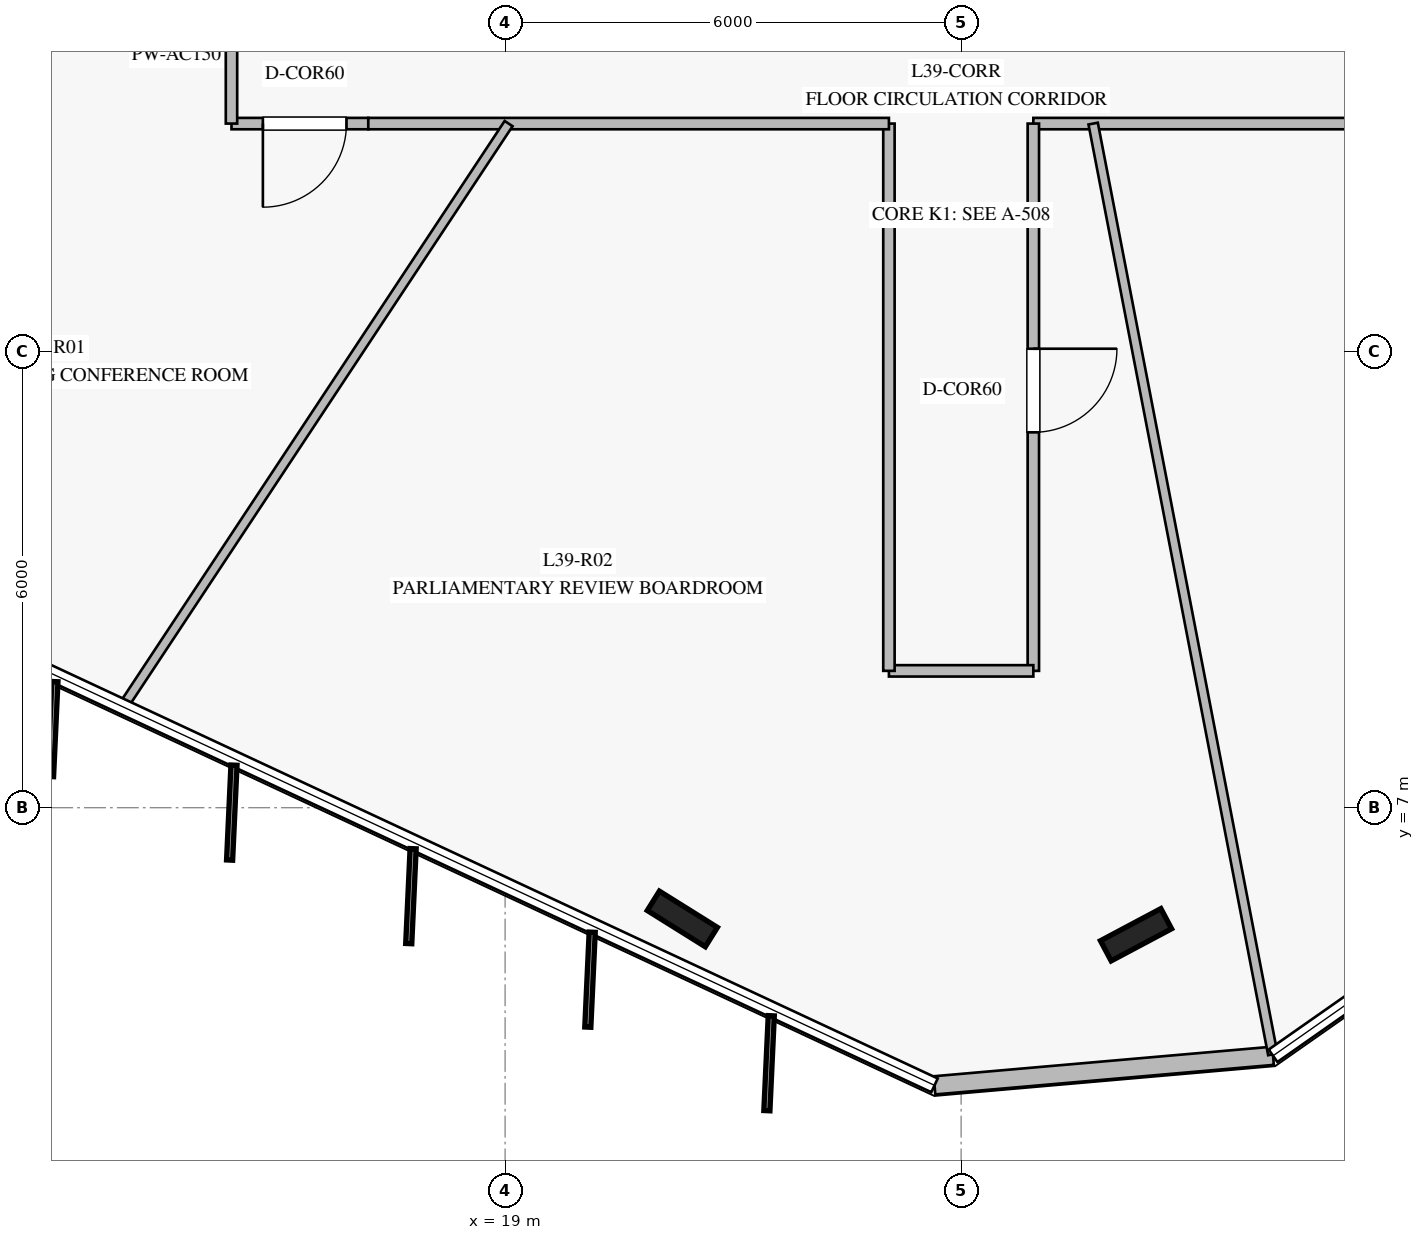
"""IFC4 building model, lengths in metres.
Left out: names, types, materials, properties, quantities, classifications, styles, units other than length and angle.
Written with IfcOpenShell. Run it as: python <this file> out.ifc"""

import sys

from ifc_helpers import new_model, si_unit, direction, frame, frame_2d, origin, origin_2d, place, context, subcontext, project, spatial, rectangle, i_section, extrude, element, fill, save


model = new_model("IFC4")
c1 = context("Model", 3, precision=1e-05, world=origin(), true_north=direction((0.0, 1.0)))
c2 = subcontext(c1, "Body", "Model", "MODEL_VIEW")
j1 = project(units=[si_unit("LENGTHUNIT", "METRE"), si_unit("PLANEANGLEUNIT", "RADIAN")], contexts=[c1])
p1 = place(None, origin())
s1 = spatial("IfcSite", under=j1, at=p1, CompositionType="ELEMENT")
p2 = place(p1, origin())
s2 = spatial("IfcBuilding", under=s1, at=p2, CompositionType="ELEMENT")
p3 = place(p2, frame((0.0, 0.0, 162.4)))
s3 = spatial("IfcBuildingStorey", under=s2, at=p3, CompositionType="ELEMENT", Elevation=162.4)
for number, where, z_axis, x_axis in (
    (1, (21.332, 5.536, 0.0), (0.0, 0.0, 1.0), (-0.848, 0.53, 0.0)),
    (2, (27.301, 5.328, 0.0), (0.0, 0.0, 1.0), (0.883, 0.469, 0.0)),
):
    element("IfcColumn", number, at=place(p3, frame(where, z_axis=z_axis, x_axis=x_axis)), inside=s3, PredefinedType="COLUMN", context=c2, shape_type="SweptSolid", body=[
        extrude(i_section(OverallWidth=0.3, OverallDepth=0.9, WebThickness=0.019, FlangeThickness=0.035, at=origin_2d()), origin(), (0.0, 0.0, 1.0), 4.0),
    ])
p4 = place(p3, frame((24.65, 3.347, 0.0), z_axis=(0.0, 0.0, 1.0), x_axis=(0.996204852099, 0.087039603938, 0.0)))
e3 = element("IfcWall", 3, at=p4, inside=s3, PredefinedType="STANDARD", context=c2, shape_type="SweptSolid", body=[
    extrude(rectangle(XDim=4.471, YDim=0.24, at=frame_2d((2.236, 0.0))), origin(), (0.0, 0.0, 1.0), 3.76),
])
p5 = place(p3, frame((17.2, 16.0, 0.0), z_axis=(0.0, 0.0, 1.0), x_axis=(-1.0, 0.0, 0.0)))
e4 = element("IfcWall", 4, at=p5, inside=s3, PredefinedType="PARTITIONING", context=c2, shape_type="SweptSolid", body=[
    extrude(rectangle(XDim=1.8, YDim=0.15, at=frame_2d((0.9, 0.0))), origin(), (0.0, 0.0, 1.0), 3.36),
])
p6 = place(p5, frame((0.287, 0.0, 0.0)))
e5 = element("IfcOpeningElement", 5, at=p6, cuts=e4, PredefinedType="OPENING", context=c2, shape_type="SweptSolid", body=[
    extrude(rectangle(XDim=1.1, YDim=2.2, at=frame_2d((0.55, 1.1))), frame((0.0, 0.085, 0.0), z_axis=(0.0, -1.0, 0.0), x_axis=(1.0, 0.0, 0.0)), (0.0, 0.0, 1.0), 0.17),
])
p7 = place(p3, frame((15.4, 16.0, 0.0), z_axis=(0.0, 0.0, 1.0), x_axis=(0.0, 1.0, 0.0)))
e6 = element("IfcWall", 6, at=p7, inside=s3, PredefinedType="PARTITIONING", context=c2, shape_type="SweptSolid", body=[
    extrude(rectangle(XDim=1.8, YDim=0.15, at=frame_2d((0.9, 0.0))), origin(), (0.0, 0.0, 1.0), 3.21),
])
p8 = place(p3, frame((41.2, 16.0, 0.0), z_axis=(0.0, 0.0, 1.0), x_axis=(-1.0, 0.0, 0.0)))
e7 = element("IfcWall", 7, at=p8, inside=s3, PredefinedType="PARTITIONING", context=c2, shape_type="SweptSolid", body=[
    extrude(rectangle(XDim=15.25, YDim=0.15, at=frame_2d((7.625, 0.0))), origin(), (0.0, 0.0, 1.0), 3.21),
])
p9 = place(p8, frame((9.792, 0.0, 0.0)))
e8 = element("IfcOpeningElement", 8, at=p9, cuts=e7, PredefinedType="OPENING", context=c2, shape_type="SweptSolid", body=[
    extrude(rectangle(XDim=1.1, YDim=2.2, at=frame_2d((0.55, 1.1))), frame((0.0, 0.085, 0.0), z_axis=(0.0, -1.0, 0.0), x_axis=(1.0, 0.0, 0.0)), (0.0, 0.0, 1.0), 0.17),
])
p10 = place(p3, frame((25.95, 16.0, 0.0), z_axis=(0.0, 0.0, 1.0), x_axis=(0.0, -1.0, 0.0)))
e9 = element("IfcWall", 9, at=p10, inside=s3, PredefinedType="PARTITIONING", context=c2, shape_type="SweptSolid", body=[
    extrude(rectangle(XDim=7.2, YDim=0.15, at=frame_2d((3.6, 0.0))), origin(), (0.0, 0.0, 1.0), 3.36),
])
p11 = place(p10, frame((2.962, 0.0, 0.0)))
e10 = element("IfcOpeningElement", 10, at=p11, cuts=e9, PredefinedType="OPENING", context=c2, shape_type="SweptSolid", body=[
    extrude(rectangle(XDim=1.1, YDim=2.2, at=frame_2d((0.55, 1.1))), frame((0.0, 0.085, 0.0), z_axis=(0.0, -1.0, 0.0), x_axis=(1.0, 0.0, 0.0)), (0.0, 0.0, 1.0), 0.17),
])
p12 = place(p3, frame((25.95, 8.8, 0.0), z_axis=(0.0, 0.0, 1.0), x_axis=(-1.0, 0.0, 0.0)))
e11 = element("IfcWall", 11, at=p12, inside=s3, PredefinedType="PARTITIONING", context=c2, shape_type="SweptSolid", body=[
    extrude(rectangle(XDim=1.9, YDim=0.15, at=frame_2d((0.95, 0.0))), origin(), (0.0, 0.0, 1.0), 3.76),
])
p13 = place(p3, frame((24.05, 8.8, 0.0), z_axis=(0.0, 0.0, 1.0), x_axis=(0.0, 1.0, 0.0)))
e12 = element("IfcWall", 12, at=p13, inside=s3, PredefinedType="PARTITIONING", context=c2, shape_type="SweptSolid", body=[
    extrude(rectangle(XDim=7.2, YDim=0.15, at=frame_2d((3.6, 0.0))), origin(), (0.0, 0.0, 1.0), 3.36),
])
p14 = place(p3, frame((24.05, 16.0, 0.0), z_axis=(0.0, 0.0, 1.0), x_axis=(-1.0, 0.0, 0.0)))
e13 = element("IfcWall", 13, at=p14, inside=s3, PredefinedType="PARTITIONING", context=c2, shape_type="SweptSolid", body=[
    extrude(rectangle(XDim=6.85, YDim=0.15, at=frame_2d((3.425, 0.0))), origin(), (0.0, 0.0, 1.0), 3.21),
])
p15 = place(p3, frame((15.4, 19.662, 0.0), z_axis=(0.0, 0.0, 1.0), x_axis=(-0.873962612359, -0.48599316065, 0.0)))
e14 = element("IfcWall", 14, at=p15, inside=s3, PredefinedType="PARTITIONING", context=c2, shape_type="SweptSolid", body=[
    extrude(rectangle(XDim=10.652, YDim=0.125, at=frame_2d((5.326, 0.0))), origin(), (0.0, 0.0, 1.0), 3.16),
])
p16 = place(p3, frame((19.046, 16.0, 0.0), z_axis=(0.0, 0.0, 1.0), x_axis=(-0.551726848641, -0.834024870426, 0.0)))
e15 = element("IfcWall", 15, at=p16, inside=s3, PredefinedType="PARTITIONING", context=c2, shape_type="SweptSolid", body=[
    extrude(rectangle(XDim=9.182, YDim=0.125, at=frame_2d((4.591, 0.0))), origin(), (0.0, 0.0, 1.0), 3.16),
])
p17 = place(p3, frame((26.737, 16.0, 0.0), z_axis=(0.0, 0.0, 1.0), x_axis=(0.189557453442, -0.981869630778, 0.0)))
e16 = element("IfcWall", 16, at=p17, inside=s3, PredefinedType="PARTITIONING", context=c2, shape_type="SweptSolid", body=[
    extrude(rectangle(XDim=12.471, YDim=0.125, at=frame_2d((6.236, 0.0))), origin(), (0.0, 0.0, 1.0), 3.16),
])
p18 = place(p6, origin())
e17 = element("IfcDoor", 17, at=p18, inside=s3, OperationType="SINGLE_SWING_RIGHT", PredefinedType="DOOR", context=c2, shape_type="SweptSolid", body=[
    extrude(rectangle(XDim=1.1, YDim=2.2, at=frame_2d((0.55, 1.1))), frame((0.0, 0.025, 0.0), z_axis=(0.0, -1.0, 0.0), x_axis=(1.0, 0.0, 0.0)), (0.0, 0.0, 1.0), 0.05),
])
fill(e5, e17)
p19 = place(p11, origin())
e18 = element("IfcDoor", 18, at=p19, inside=s3, OperationType="SINGLE_SWING_LEFT", PredefinedType="DOOR", context=c2, shape_type="SweptSolid", body=[
    extrude(rectangle(XDim=1.1, YDim=2.2, at=frame_2d((0.55, 1.1))), frame((0.0, 0.025, 0.0), z_axis=(0.0, -1.0, 0.0), x_axis=(1.0, 0.0, 0.0)), (0.0, 0.0, 1.0), 0.05),
])
fill(e10, e18)
save(model, sys.argv[1])
